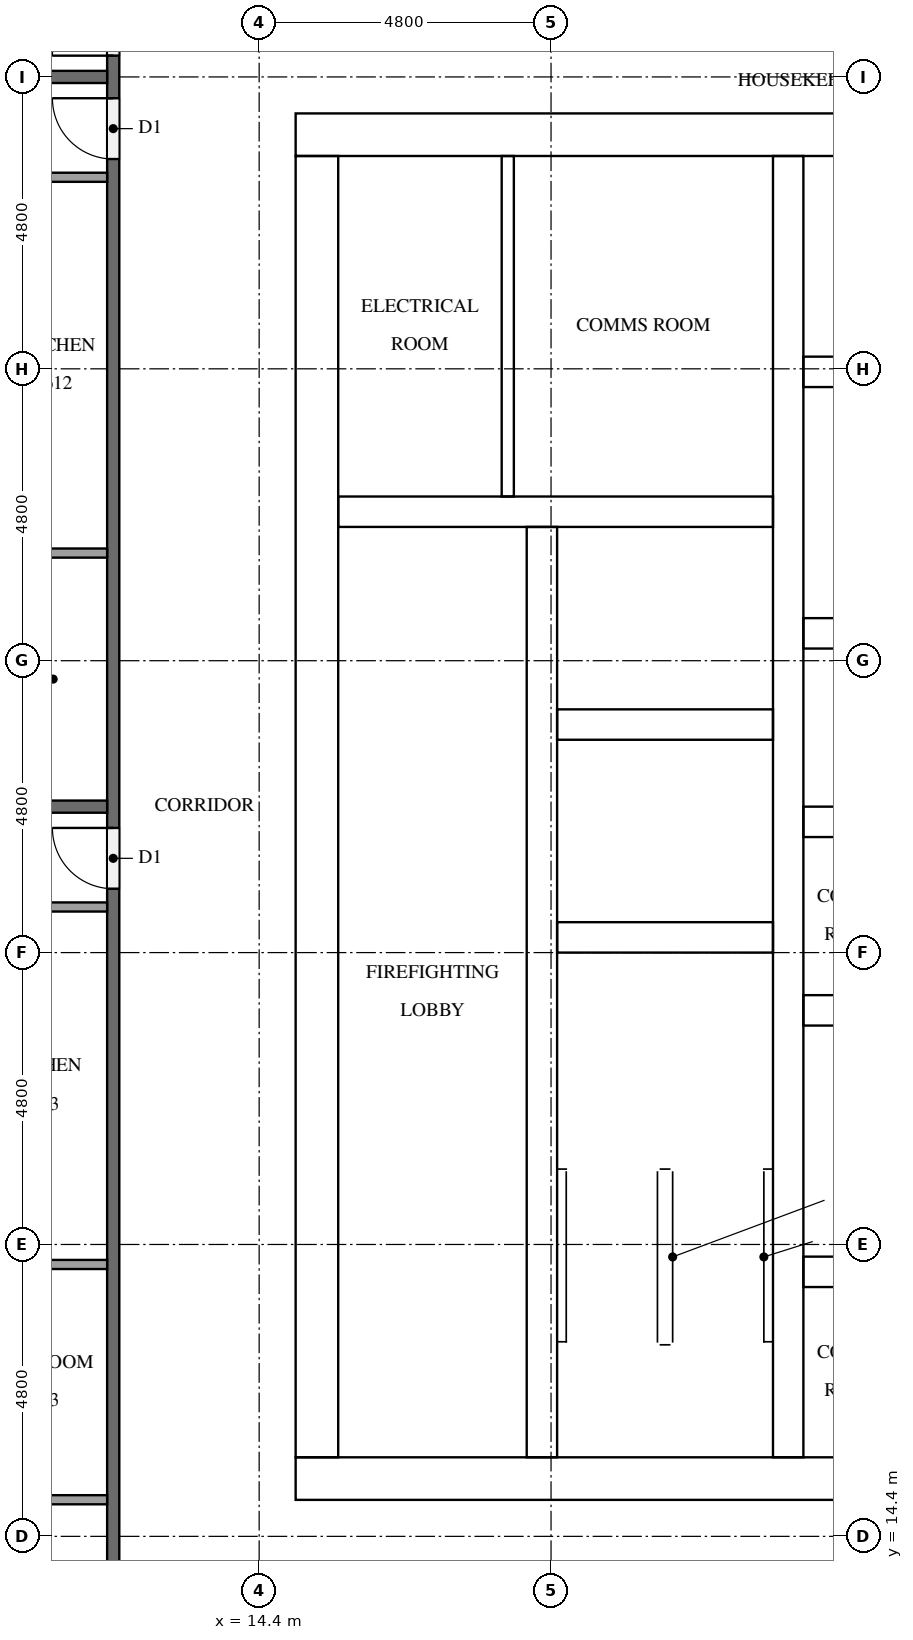
"""IFC4 building model, lengths in metres.
Left out: names, types, materials, properties, quantities, classifications, styles, units other than length and angle.
Written with IfcOpenShell. Run it as: python <this file> out.ifc"""

import sys

from ifc_helpers import new_model, si_unit, direction, frame, frame_2d, origin, place, context, subcontext, project, spatial, rectangle, extrude, element, fill, save


model = new_model("IFC4")
c1 = context("Model", 3, precision=1e-05, world=origin(), true_north=direction((0.0, 1.0)))
c2 = subcontext(c1, "Body", "Model", "MODEL_VIEW")
j1 = project(units=[si_unit("LENGTHUNIT", "METRE"), si_unit("PLANEANGLEUNIT", "RADIAN")], contexts=[c1])
p1 = place(None, origin())
s1 = spatial("IfcSite", under=j1, at=p1, CompositionType="ELEMENT")
p2 = place(p1, origin())
s2 = spatial("IfcBuilding", under=s1, at=p2, CompositionType="ELEMENT")
p3 = place(p2, frame((0.0, 0.0, 178.9)))
s3 = spatial("IfcBuildingStorey", under=s2, at=p3, CompositionType="ELEMENT", Elevation=178.9)
p4 = place(p3, frame((15.0, 15.35, 0.0), z_axis=(0.0, 0.0, 1.0), x_axis=(1.0, 0.0, 0.0)))
e1 = element("IfcWall", 1, at=p4, inside=s3, PredefinedType="SHEAR", context=c2, shape_type="SweptSolid", body=[
    extrude(rectangle(XDim=32.4, YDim=0.7, at=frame_2d((16.2, 0.0))), origin(), (0.0, 0.0, 1.0), 3.2),
])
p5 = place(p4, frame((15.3, 0.0, 0.0)))
e2 = element("IfcOpeningElement", 2, at=p5, cuts=e1, PredefinedType="OPENING", context=c2, shape_type="SweptSolid", body=[
    extrude(rectangle(XDim=1.8, YDim=2.1, at=frame_2d((0.9, 1.05))), frame((0.0, 0.36, 0.0), z_axis=(0.0, -1.0, 0.0), x_axis=(1.0, 0.0, 0.0)), (0.0, 0.0, 1.0), 0.72),
])
p6 = place(p3, frame((15.0, 37.45, 0.0), z_axis=(0.0, 0.0, 1.0), x_axis=(1.0, 0.0, 0.0)))
e3 = element("IfcWall", 3, at=p6, inside=s3, PredefinedType="SHEAR", context=c2, shape_type="SweptSolid", body=[
    extrude(rectangle(XDim=32.4, YDim=0.7, at=frame_2d((16.2, 0.0))), origin(), (0.0, 0.0, 1.0), 3.2),
])
p7 = place(p6, frame((15.3, 0.0, 0.0)))
e4 = element("IfcOpeningElement", 4, at=p7, cuts=e3, PredefinedType="OPENING", context=c2, shape_type="SweptSolid", body=[
    extrude(rectangle(XDim=1.8, YDim=2.1, at=frame_2d((0.9, 1.05))), frame((0.0, 0.36, 0.0), z_axis=(0.0, -1.0, 0.0), x_axis=(1.0, 0.0, 0.0)), (0.0, 0.0, 1.0), 0.72),
])
p8 = place(p6, frame((1.544, 0.0, 0.0)))
e5 = element("IfcOpeningElement", 5, at=p8, cuts=e3, PredefinedType="OPENING", context=c2, shape_type="SweptSolid", body=[
    extrude(rectangle(XDim=1.0, YDim=2.1, at=frame_2d((0.5, 1.05))), frame((0.0, 0.36, 0.0), z_axis=(0.0, -1.0, 0.0), x_axis=(1.0, 0.0, 0.0)), (0.0, 0.0, 1.0), 0.72),
])
p9 = place(p6, frame((5.219, 0.0, 0.0)))
e6 = element("IfcOpeningElement", 6, at=p9, cuts=e3, PredefinedType="OPENING", context=c2, shape_type="SweptSolid", body=[
    extrude(rectangle(XDim=1.0, YDim=2.1, at=frame_2d((0.5, 1.05))), frame((0.0, 0.36, 0.0), z_axis=(0.0, -1.0, 0.0), x_axis=(1.0, 0.0, 0.0)), (0.0, 0.0, 1.0), 0.72),
])
p10 = place(p3, frame((15.35, 15.7, 0.0), z_axis=(0.0, 0.0, 1.0), x_axis=(0.0, 1.0, 0.0)))
e7 = element("IfcWall", 7, at=p10, inside=s3, PredefinedType="SHEAR", context=c2, shape_type="SweptSolid", body=[
    extrude(rectangle(XDim=21.4, YDim=0.7, at=frame_2d((10.7, 0.0))), origin(), (0.0, 0.0, 1.0), 3.2),
])
p11 = place(p10, frame((5.06, 0.0, 0.0)))
e8 = element("IfcOpeningElement", 8, at=p11, cuts=e7, PredefinedType="OPENING", context=c2, shape_type="SweptSolid", body=[
    extrude(rectangle(XDim=1.2, YDim=2.1, at=frame_2d((0.6, 1.05))), frame((0.0, 0.36, 0.0), z_axis=(0.0, -1.0, 0.0), x_axis=(1.0, 0.0, 0.0)), (0.0, 0.0, 1.0), 0.72),
])
p12 = place(p3, frame((19.05, 15.7, 0.0), z_axis=(0.0, 0.0, 1.0), x_axis=(0.0, 1.0, 0.0)))
e9 = element("IfcWall", 9, at=p12, inside=s3, PredefinedType="SHEAR", context=c2, shape_type="SweptSolid", body=[
    extrude(rectangle(XDim=15.3, YDim=0.5, at=frame_2d((7.65, 0.0))), origin(), (0.0, 0.0, 1.0), 3.2),
])
p13 = place(p12, frame((9.75, 0.0, 0.0)))
e10 = element("IfcOpeningElement", 10, at=p13, cuts=e9, PredefinedType="OPENING", context=c2, shape_type="SweptSolid", body=[
    extrude(rectangle(XDim=1.1, YDim=2.1, at=frame_2d((0.55, 1.05))), frame((0.0, 0.26, 0.0), z_axis=(0.0, -1.0, 0.0), x_axis=(1.0, 0.0, 0.0)), (0.0, 0.0, 1.0), 0.52),
])
p14 = place(p12, frame((13.25, 0.0, 0.0)))
e11 = element("IfcOpeningElement", 11, at=p14, cuts=e9, PredefinedType="OPENING", context=c2, shape_type="SweptSolid", body=[
    extrude(rectangle(XDim=1.1, YDim=2.1, at=frame_2d((0.55, 1.05))), frame((0.0, 0.26, 0.0), z_axis=(0.0, -1.0, 0.0), x_axis=(1.0, 0.0, 0.0)), (0.0, 0.0, 1.0), 0.52),
])
p15 = place(p12, frame((0.5, 0.0, 0.0)))
e12 = element("IfcOpeningElement", 12, at=p15, cuts=e9, PredefinedType="OPENING", context=c2, shape_type="SweptSolid", body=[
    extrude(rectangle(XDim=1.2, YDim=2.1, at=frame_2d((0.6, 1.05))), frame((0.0, 0.26, 0.0), z_axis=(0.0, -1.0, 0.0), x_axis=(1.0, 0.0, 0.0)), (0.0, 0.0, 1.0), 0.52),
])
p16 = place(p3, frame((23.1, 15.7, 0.0), z_axis=(0.0, 0.0, 1.0), x_axis=(0.0, 1.0, 0.0)))
e13 = element("IfcWall", 13, at=p16, inside=s3, PredefinedType="SHEAR", context=c2, shape_type="SweptSolid", body=[
    extrude(rectangle(XDim=21.4, YDim=0.5, at=frame_2d((10.7, 0.0))), origin(), (0.0, 0.0, 1.0), 3.2),
])
for number, where, z_axis, x_axis in (
    (14, (19.3, 24.25, 0.0), (0.0, 0.0, 1.0), (1.0, 0.0, 0.0)),
    (15, (19.3, 27.75, 0.0), (0.0, 0.0, 1.0), (1.0, 0.0, 0.0)),
):
    element("IfcWall", number, at=place(p3, frame(where, z_axis=z_axis, x_axis=x_axis)), inside=s3, PredefinedType="SHEAR", context=c2, shape_type="SweptSolid", body=[
        extrude(rectangle(XDim=3.55, YDim=0.5, at=frame_2d((1.775, 0.0))), origin(), (0.0, 0.0, 1.0), 3.2),
    ])
p17 = place(p3, frame((15.7, 31.25, 0.0), z_axis=(0.0, 0.0, 1.0), x_axis=(1.0, 0.0, 0.0)))
e16 = element("IfcWall", 16, at=p17, inside=s3, PredefinedType="SHEAR", context=c2, shape_type="SweptSolid", body=[
    extrude(rectangle(XDim=7.15, YDim=0.5, at=frame_2d((3.575, 0.0))), origin(), (0.0, 0.0, 1.0), 3.2),
])
p18 = place(p3, frame((23.35, 18.75, 0.0), z_axis=(0.0, 0.0, 1.0), x_axis=(1.0, 0.0, 0.0)))
e17 = element("IfcWall", 17, at=p18, inside=s3, PredefinedType="SHEAR", context=c2, shape_type="SweptSolid", body=[
    extrude(rectangle(XDim=5.6, YDim=0.5, at=frame_2d((2.8, 0.0))), origin(), (0.0, 0.0, 1.0), 3.2),
])
p19 = place(p18, frame((0.317, 0.0, 0.0)))
e18 = element("IfcOpeningElement", 18, at=p19, cuts=e17, PredefinedType="OPENING", context=c2, shape_type="SweptSolid", body=[
    extrude(rectangle(XDim=1.0, YDim=2.1, at=frame_2d((0.5, 1.05))), frame((0.0, 0.26, 0.0), z_axis=(0.0, -1.0, 0.0), x_axis=(1.0, 0.0, 0.0)), (0.0, 0.0, 1.0), 0.52),
])
p20 = place(p18, frame((2.967, 0.0, 0.0)))
e19 = element("IfcOpeningElement", 19, at=p20, cuts=e17, PredefinedType="OPENING", context=c2, shape_type="SweptSolid", body=[
    extrude(rectangle(XDim=1.0, YDim=2.1, at=frame_2d((0.5, 1.05))), frame((0.0, 0.26, 0.0), z_axis=(0.0, -1.0, 0.0), x_axis=(1.0, 0.0, 0.0)), (0.0, 0.0, 1.0), 0.52),
])
p21 = place(p3, frame((23.35, 23.05, 0.0), z_axis=(0.0, 0.0, 1.0), x_axis=(1.0, 0.0, 0.0)))
e20 = element("IfcWall", 20, at=p21, inside=s3, PredefinedType="SHEAR", context=c2, shape_type="SweptSolid", body=[
    extrude(rectangle(XDim=15.7, YDim=0.5, at=frame_2d((7.85, 0.0))), origin(), (0.0, 0.0, 1.0), 3.2),
])
p22 = place(p21, frame((0.317, 0.0, 0.0)))
e21 = element("IfcOpeningElement", 21, at=p22, cuts=e20, PredefinedType="OPENING", context=c2, shape_type="SweptSolid", body=[
    extrude(rectangle(XDim=1.0, YDim=2.1, at=frame_2d((0.5, 1.05))), frame((0.0, 0.26, 0.0), z_axis=(0.0, -1.0, 0.0), x_axis=(1.0, 0.0, 0.0)), (0.0, 0.0, 1.0), 0.52),
])
p23 = place(p21, frame((2.967, 0.0, 0.0)))
e22 = element("IfcOpeningElement", 22, at=p23, cuts=e20, PredefinedType="OPENING", context=c2, shape_type="SweptSolid", body=[
    extrude(rectangle(XDim=1.0, YDim=2.1, at=frame_2d((0.5, 1.05))), frame((0.0, 0.26, 0.0), z_axis=(0.0, -1.0, 0.0), x_axis=(1.0, 0.0, 0.0)), (0.0, 0.0, 1.0), 0.52),
])
p24 = place(p21, frame((10.917, 0.0, 0.0)))
e23 = element("IfcOpeningElement", 23, at=p24, cuts=e20, PredefinedType="OPENING", context=c2, shape_type="SweptSolid", body=[
    extrude(rectangle(XDim=1.0, YDim=2.1, at=frame_2d((0.5, 1.05))), frame((0.0, 0.26, 0.0), z_axis=(0.0, -1.0, 0.0), x_axis=(1.0, 0.0, 0.0)), (0.0, 0.0, 1.0), 0.52),
])
p25 = place(p21, frame((13.567, 0.0, 0.0)))
e24 = element("IfcOpeningElement", 24, at=p25, cuts=e20, PredefinedType="OPENING", context=c2, shape_type="SweptSolid", body=[
    extrude(rectangle(XDim=1.0, YDim=2.1, at=frame_2d((0.5, 1.05))), frame((0.0, 0.26, 0.0), z_axis=(0.0, -1.0, 0.0), x_axis=(1.0, 0.0, 0.0)), (0.0, 0.0, 1.0), 0.52),
])
p26 = place(p3, frame((23.35, 26.15, 0.0), z_axis=(0.0, 0.0, 1.0), x_axis=(1.0, 0.0, 0.0)))
e25 = element("IfcWall", 25, at=p26, inside=s3, PredefinedType="SHEAR", context=c2, shape_type="SweptSolid", body=[
    extrude(rectangle(XDim=15.7, YDim=0.5, at=frame_2d((7.85, 0.0))), origin(), (0.0, 0.0, 1.0), 3.2),
])
p27 = place(p3, frame((23.35, 29.25, 0.0), z_axis=(0.0, 0.0, 1.0), x_axis=(1.0, 0.0, 0.0)))
e26 = element("IfcWall", 26, at=p27, inside=s3, PredefinedType="SHEAR", context=c2, shape_type="SweptSolid", body=[
    extrude(rectangle(XDim=15.7, YDim=0.5, at=frame_2d((7.85, 0.0))), origin(), (0.0, 0.0, 1.0), 3.2),
])
p28 = place(p27, frame((0.675, 0.0, 0.0)))
e27 = element("IfcOpeningElement", 27, at=p28, cuts=e26, PredefinedType="OPENING", context=c2, shape_type="SweptSolid", body=[
    extrude(rectangle(XDim=1.1, YDim=2.1, at=frame_2d((0.55, 1.05))), frame((0.0, 0.26, 0.0), z_axis=(0.0, -1.0, 0.0), x_axis=(1.0, 0.0, 0.0)), (0.0, 0.0, 1.0), 0.52),
])
p29 = place(p27, frame((3.325, 0.0, 0.0)))
e28 = element("IfcOpeningElement", 28, at=p29, cuts=e26, PredefinedType="OPENING", context=c2, shape_type="SweptSolid", body=[
    extrude(rectangle(XDim=1.1, YDim=2.1, at=frame_2d((0.55, 1.05))), frame((0.0, 0.26, 0.0), z_axis=(0.0, -1.0, 0.0), x_axis=(1.0, 0.0, 0.0)), (0.0, 0.0, 1.0), 0.52),
])
p30 = place(p27, frame((5.975, 0.0, 0.0)))
e29 = element("IfcOpeningElement", 29, at=p30, cuts=e26, PredefinedType="OPENING", context=c2, shape_type="SweptSolid", body=[
    extrude(rectangle(XDim=1.1, YDim=2.1, at=frame_2d((0.55, 1.05))), frame((0.0, 0.26, 0.0), z_axis=(0.0, -1.0, 0.0), x_axis=(1.0, 0.0, 0.0)), (0.0, 0.0, 1.0), 0.52),
])
p31 = place(p27, frame((8.625, 0.0, 0.0)))
e30 = element("IfcOpeningElement", 30, at=p31, cuts=e26, PredefinedType="OPENING", context=c2, shape_type="SweptSolid", body=[
    extrude(rectangle(XDim=1.1, YDim=2.1, at=frame_2d((0.55, 1.05))), frame((0.0, 0.26, 0.0), z_axis=(0.0, -1.0, 0.0), x_axis=(1.0, 0.0, 0.0)), (0.0, 0.0, 1.0), 0.52),
])
p32 = place(p27, frame((11.275, 0.0, 0.0)))
e31 = element("IfcOpeningElement", 31, at=p32, cuts=e26, PredefinedType="OPENING", context=c2, shape_type="SweptSolid", body=[
    extrude(rectangle(XDim=1.1, YDim=2.1, at=frame_2d((0.55, 1.05))), frame((0.0, 0.26, 0.0), z_axis=(0.0, -1.0, 0.0), x_axis=(1.0, 0.0, 0.0)), (0.0, 0.0, 1.0), 0.52),
])
p33 = place(p27, frame((13.925, 0.0, 0.0)))
e32 = element("IfcOpeningElement", 32, at=p33, cuts=e26, PredefinedType="OPENING", context=c2, shape_type="SweptSolid", body=[
    extrude(rectangle(XDim=1.1, YDim=2.1, at=frame_2d((0.55, 1.05))), frame((0.0, 0.26, 0.0), z_axis=(0.0, -1.0, 0.0), x_axis=(1.0, 0.0, 0.0)), (0.0, 0.0, 1.0), 0.52),
])
p34 = place(p3, frame((23.35, 33.55, 0.0), z_axis=(0.0, 0.0, 1.0), x_axis=(1.0, 0.0, 0.0)))
e33 = element("IfcWall", 33, at=p34, inside=s3, PredefinedType="SHEAR", context=c2, shape_type="SweptSolid", body=[
    extrude(rectangle(XDim=5.6, YDim=0.5, at=frame_2d((2.8, 0.0))), origin(), (0.0, 0.0, 1.0), 3.2),
])
p35 = place(p34, frame((0.164, 0.0, 0.0)))
e34 = element("IfcOpeningElement", 34, at=p35, cuts=e33, PredefinedType="OPENING", context=c2, shape_type="SweptSolid", body=[
    extrude(rectangle(XDim=1.0, YDim=2.1, at=frame_2d((0.5, 1.05))), frame((0.0, 0.26, 0.0), z_axis=(0.0, -1.0, 0.0), x_axis=(1.0, 0.0, 0.0)), (0.0, 0.0, 1.0), 0.52),
])
p36 = place(p34, frame((2.814, 0.0, 0.0)))
e35 = element("IfcOpeningElement", 35, at=p36, cuts=e33, PredefinedType="OPENING", context=c2, shape_type="SweptSolid", body=[
    extrude(rectangle(XDim=1.0, YDim=2.1, at=frame_2d((0.5, 1.05))), frame((0.0, 0.26, 0.0), z_axis=(0.0, -1.0, 0.0), x_axis=(1.0, 0.0, 0.0)), (0.0, 0.0, 1.0), 0.52),
])
p37 = place(p3, frame((18.489, 31.5, 0.0), z_axis=(0.0, 0.0, 1.0), x_axis=(0.0, 1.0, 0.0)))
e36 = element("IfcWall", 36, at=p37, inside=s3, PredefinedType="PARTITIONING", context=c2, shape_type="SweptSolid", body=[
    extrude(rectangle(XDim=5.6, YDim=0.2, at=frame_2d((2.8, 0.0))), origin(), (0.0, 0.0, 1.0), 3.2),
])
p38 = place(p3, frame((12.0, 12.1, 0.0), z_axis=(0.0, 0.0, 1.0), x_axis=(0.0, 1.0, 0.0)))
e37 = element("IfcWall", 37, at=p38, inside=s3, PredefinedType="PARTITIONING", context=c2, shape_type="SweptSolid", body=[
    extrude(rectangle(XDim=28.6, YDim=0.2, at=frame_2d((14.3, 0.0))), origin(), (0.0, 0.0, 1.0), 3.2),
])
p39 = place(p38, frame((26.65, 0.0, 0.0)))
e38 = element("IfcOpeningElement", 38, at=p39, cuts=e37, PredefinedType="OPENING", context=c2, shape_type="SweptSolid", body=[
    extrude(rectangle(XDim=1.0, YDim=2.1, at=frame_2d((0.5, 1.05))), frame((0.0, 0.11, 0.0), z_axis=(0.0, -1.0, 0.0), x_axis=(1.0, 0.0, 0.0)), (0.0, 0.0, 1.0), 0.22),
])
p40 = place(p38, frame((24.95, 0.0, 0.0)))
e39 = element("IfcOpeningElement", 39, at=p40, cuts=e37, PredefinedType="OPENING", context=c2, shape_type="SweptSolid", body=[
    extrude(rectangle(XDim=1.0, YDim=2.1, at=frame_2d((0.5, 1.05))), frame((0.0, 0.11, 0.0), z_axis=(0.0, -1.0, 0.0), x_axis=(1.0, 0.0, 0.0)), (0.0, 0.0, 1.0), 0.22),
])
p41 = place(p38, frame((12.95, 0.0, 0.0)))
e40 = element("IfcOpeningElement", 40, at=p41, cuts=e37, PredefinedType="OPENING", context=c2, shape_type="SweptSolid", body=[
    extrude(rectangle(XDim=1.0, YDim=2.1, at=frame_2d((0.5, 1.05))), frame((0.0, 0.11, 0.0), z_axis=(0.0, -1.0, 0.0), x_axis=(1.0, 0.0, 0.0)), (0.0, 0.0, 1.0), 0.22),
])
for number, where, z_axis, x_axis in (
    (41, (4.9, 38.4, 0.0), (0.0, 0.0, 1.0), (1.0, 0.0, 0.0)),
    (42, (4.9, 26.4, 0.0), (0.0, 0.0, 1.0), (1.0, 0.0, 0.0)),
):
    element("IfcWall", number, at=place(p3, frame(where, z_axis=z_axis, x_axis=x_axis)), inside=s3, PredefinedType="PARTITIONING", context=c2, shape_type="SweptSolid", body=[
        extrude(rectangle(XDim=7.0, YDim=0.2, at=frame_2d((3.5, 0.0))), origin(), (0.0, 0.0, 1.0), 3.2),
    ])
p42 = place(p3, frame((11.9, 30.57, 0.0), z_axis=(0.0, 0.0, 1.0), x_axis=(-1.0, 0.0, 0.0)))
e43 = element("IfcWall", 43, at=p42, inside=s3, PredefinedType="PARTITIONING", context=c2, shape_type="SweptSolid", body=[
    extrude(rectangle(XDim=1.775, YDim=0.15, at=frame_2d((0.887, 0.0))), origin(), (0.0, 0.0, 1.0), 3.2),
])
p43 = place(p3, frame((11.9, 36.75, 0.0), z_axis=(0.0, 0.0, 1.0), x_axis=(-1.0, 0.0, 0.0)))
e44 = element("IfcWall", 44, at=p43, inside=s3, PredefinedType="PARTITIONING", context=c2, shape_type="SweptSolid", body=[
    extrude(rectangle(XDim=1.925, YDim=0.15, at=frame_2d((0.962, 0.0))), origin(), (0.0, 0.0, 1.0), 3.2),
])
for number, where, z_axis, x_axis in (
    (45, (11.9, 18.871, 0.0), (0.0, 0.0, 1.0), (-1.0, 0.0, 0.0)),
    (46, (11.9, 15.002, 0.0), (0.0, 0.0, 1.0), (-1.0, 0.0, 0.0)),
):
    element("IfcWall", number, at=place(p3, frame(where, z_axis=z_axis, x_axis=x_axis)), inside=s3, PredefinedType="PARTITIONING", context=c2, shape_type="SweptSolid", body=[
        extrude(rectangle(XDim=2.225, YDim=0.15, at=frame_2d((1.112, 0.0))), origin(), (0.0, 0.0, 1.0), 3.2),
    ])
p44 = place(p3, frame((11.9, 24.75, 0.0), z_axis=(0.0, 0.0, 1.0), x_axis=(-1.0, 0.0, 0.0)))
e47 = element("IfcWall", 47, at=p44, inside=s3, PredefinedType="PARTITIONING", context=c2, shape_type="SweptSolid", body=[
    extrude(rectangle(XDim=2.375, YDim=0.15, at=frame_2d((1.188, 0.0))), origin(), (0.0, 0.0, 1.0), 3.2),
])
p45 = place(p13, origin())
e48 = element("IfcDoor", 48, at=p45, inside=s3, OperationType="DOUBLE_DOOR_SLIDING", PredefinedType="DOOR", context=c2, shape_type="SweptSolid", body=[
    extrude(rectangle(XDim=1.1, YDim=2.1, at=frame_2d((0.55, 1.05))), frame((0.0, 0.025, 0.0), z_axis=(0.0, -1.0, 0.0), x_axis=(1.0, 0.0, 0.0)), (0.0, 0.0, 1.0), 0.05),
])
fill(e10, e48)
p46 = place(p14, origin())
e49 = element("IfcDoor", 49, at=p46, inside=s3, OperationType="DOUBLE_DOOR_SLIDING", PredefinedType="DOOR", context=c2, shape_type="SweptSolid", body=[
    extrude(rectangle(XDim=1.1, YDim=2.1, at=frame_2d((0.55, 1.05))), frame((0.0, 0.025, 0.0), z_axis=(0.0, -1.0, 0.0), x_axis=(1.0, 0.0, 0.0)), (0.0, 0.0, 1.0), 0.05),
])
fill(e11, e49)
p47 = place(p15, frame((1.2, 0.0, 0.0), z_axis=(0.0, 0.0, 1.0), x_axis=(-1.0, 0.0, 0.0)))
e50 = element("IfcDoor", 50, at=p47, inside=s3, OperationType="SINGLE_SWING_RIGHT", PredefinedType="DOOR", context=c2, shape_type="SweptSolid", body=[
    extrude(rectangle(XDim=1.2, YDim=2.1, at=frame_2d((0.6, 1.05))), frame((0.0, 0.025, 0.0), z_axis=(0.0, -1.0, 0.0), x_axis=(1.0, 0.0, 0.0)), (0.0, 0.0, 1.0), 0.05),
])
fill(e12, e50)
p48 = place(p11, frame((1.2, 0.0, 0.0), z_axis=(0.0, 0.0, 1.0), x_axis=(-1.0, 0.0, 0.0)))
e51 = element("IfcDoor", 51, at=p48, inside=s3, OperationType="SINGLE_SWING_LEFT", PredefinedType="DOOR", context=c2, shape_type="SweptSolid", body=[
    extrude(rectangle(XDim=1.2, YDim=2.1, at=frame_2d((0.6, 1.05))), frame((0.0, 0.025, 0.0), z_axis=(0.0, -1.0, 0.0), x_axis=(1.0, 0.0, 0.0)), (0.0, 0.0, 1.0), 0.05),
])
fill(e8, e51)
p49 = place(p8, origin())
e52 = element("IfcDoor", 52, at=p49, inside=s3, OperationType="SINGLE_SWING_LEFT", PredefinedType="DOOR", context=c2, shape_type="SweptSolid", body=[
    extrude(rectangle(XDim=1.0, YDim=2.1, at=frame_2d((0.5, 1.05))), frame((0.0, 0.025, 0.0), z_axis=(0.0, -1.0, 0.0), x_axis=(1.0, 0.0, 0.0)), (0.0, 0.0, 1.0), 0.05),
])
fill(e5, e52)
p50 = place(p9, origin())
e53 = element("IfcDoor", 53, at=p50, inside=s3, OperationType="SINGLE_SWING_RIGHT", PredefinedType="DOOR", context=c2, shape_type="SweptSolid", body=[
    extrude(rectangle(XDim=1.0, YDim=2.1, at=frame_2d((0.5, 1.05))), frame((0.0, 0.025, 0.0), z_axis=(0.0, -1.0, 0.0), x_axis=(1.0, 0.0, 0.0)), (0.0, 0.0, 1.0), 0.05),
])
fill(e6, e53)
p51 = place(p22, frame((1.0, 0.0, 0.0), z_axis=(0.0, 0.0, 1.0), x_axis=(-1.0, 0.0, 0.0)))
e54 = element("IfcDoor", 54, at=p51, inside=s3, OperationType="SINGLE_SWING_LEFT", PredefinedType="DOOR", context=c2, shape_type="SweptSolid", body=[
    extrude(rectangle(XDim=1.0, YDim=2.1, at=frame_2d((0.5, 1.05))), frame((0.0, 0.025, 0.0), z_axis=(0.0, -1.0, 0.0), x_axis=(1.0, 0.0, 0.0)), (0.0, 0.0, 1.0), 0.05),
])
fill(e21, e54)
p52 = place(p19, origin())
e55 = element("IfcDoor", 55, at=p52, inside=s3, OperationType="SINGLE_SWING_LEFT", PredefinedType="DOOR", context=c2, shape_type="SweptSolid", body=[
    extrude(rectangle(XDim=1.0, YDim=2.1, at=frame_2d((0.5, 1.05))), frame((0.0, 0.025, 0.0), z_axis=(0.0, -1.0, 0.0), x_axis=(1.0, 0.0, 0.0)), (0.0, 0.0, 1.0), 0.05),
])
fill(e18, e55)
p53 = place(p35, frame((1.0, 0.0, 0.0), z_axis=(0.0, 0.0, 1.0), x_axis=(-1.0, 0.0, 0.0)))
e56 = element("IfcDoor", 56, at=p53, inside=s3, OperationType="SINGLE_SWING_LEFT", PredefinedType="DOOR", context=c2, shape_type="SweptSolid", body=[
    extrude(rectangle(XDim=1.0, YDim=2.1, at=frame_2d((0.5, 1.05))), frame((0.0, 0.025, 0.0), z_axis=(0.0, -1.0, 0.0), x_axis=(1.0, 0.0, 0.0)), (0.0, 0.0, 1.0), 0.05),
])
fill(e34, e56)
p54 = place(p39, origin())
e57 = element("IfcDoor", 57, at=p54, inside=s3, OperationType="SINGLE_SWING_LEFT", PredefinedType="DOOR", context=c2, shape_type="SweptSolid", body=[
    extrude(rectangle(XDim=1.0, YDim=2.1, at=frame_2d((0.5, 1.05))), frame((0.0, 0.025, 0.0), z_axis=(0.0, -1.0, 0.0), x_axis=(1.0, 0.0, 0.0)), (0.0, 0.0, 1.0), 0.05),
])
fill(e38, e57)
p55 = place(p40, origin())
e58 = element("IfcDoor", 58, at=p55, inside=s3, OperationType="SINGLE_SWING_RIGHT", PredefinedType="DOOR", context=c2, shape_type="SweptSolid", body=[
    extrude(rectangle(XDim=1.0, YDim=2.1, at=frame_2d((0.5, 1.05))), frame((0.0, 0.025, 0.0), z_axis=(0.0, -1.0, 0.0), x_axis=(1.0, 0.0, 0.0)), (0.0, 0.0, 1.0), 0.05),
])
fill(e39, e58)
p56 = place(p41, origin())
e59 = element("IfcDoor", 59, at=p56, inside=s3, OperationType="SINGLE_SWING_RIGHT", PredefinedType="DOOR", context=c2, shape_type="SweptSolid", body=[
    extrude(rectangle(XDim=1.0, YDim=2.1, at=frame_2d((0.5, 1.05))), frame((0.0, 0.025, 0.0), z_axis=(0.0, -1.0, 0.0), x_axis=(1.0, 0.0, 0.0)), (0.0, 0.0, 1.0), 0.05),
])
fill(e40, e59)
save(model, sys.argv[1])
